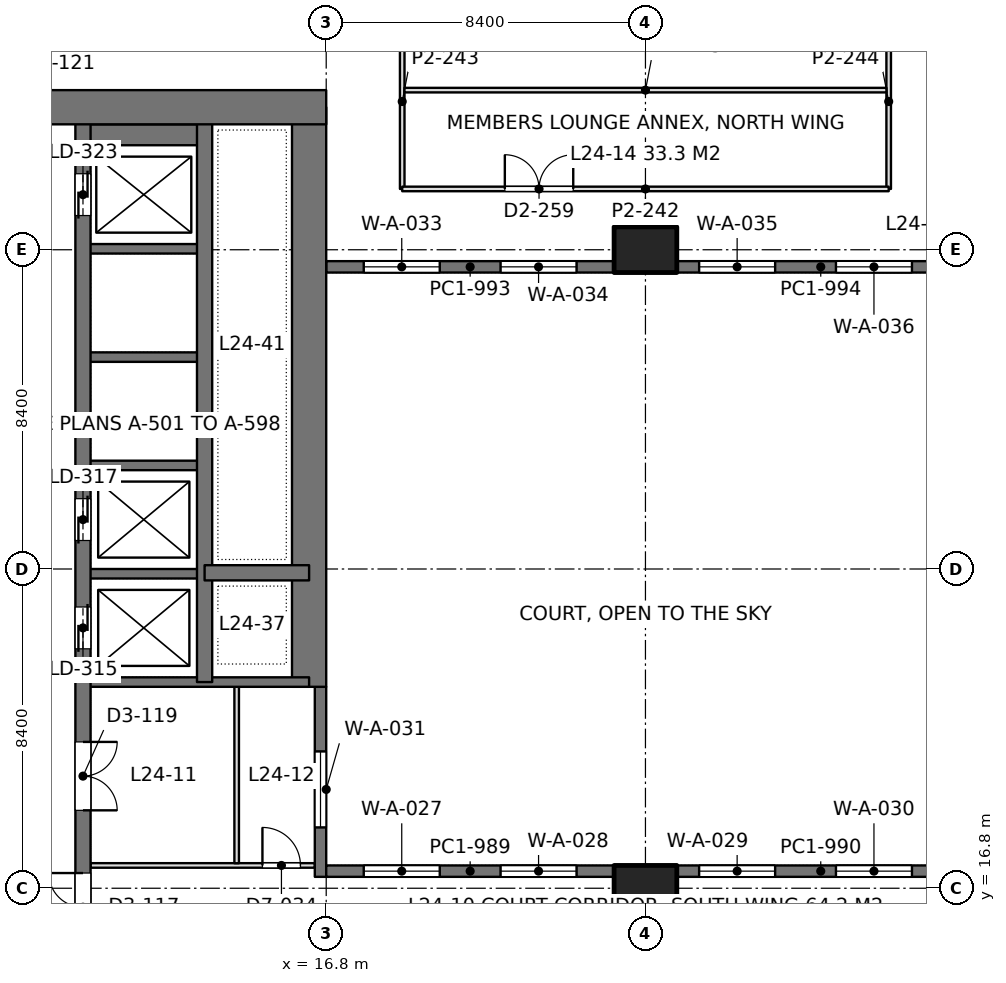
"""IFC4 building model, lengths in metres.
Left out: names, types, materials, properties, quantities, classifications, styles, units other than length and angle.
Written with IfcOpenShell. Run it as: python <this file> out.ifc"""

import sys

from ifc_helpers import new_model, si_unit, direction, frame, frame_2d, origin, origin_2d, place, context, subcontext, project, spatial, rectangle, extrude, element, fill, save


model = new_model("IFC4")
c1 = context("Model", 3, precision=1e-05, world=origin(), true_north=direction((0.0, 1.0)))
c2 = subcontext(c1, "Body", "Model", "MODEL_VIEW")
j1 = project(units=[si_unit("LENGTHUNIT", "METRE"), si_unit("PLANEANGLEUNIT", "RADIAN")], contexts=[c1])
p1 = place(None, origin())
s1 = spatial("IfcSite", under=j1, at=p1, CompositionType="ELEMENT")
p2 = place(p1, origin())
s2 = spatial("IfcBuilding", under=s1, at=p2, CompositionType="ELEMENT")
p3 = place(p2, frame((0.0, 0.0, 109.2)))
s3 = spatial("IfcBuildingStorey", under=s2, at=p3, CompositionType="ELEMENT", Elevation=109.2)
for number, where, z_axis, x_axis in (
    (1, (25.2, 16.8, 0.0), (0.0, 0.0, 1.0), (1.0, 0.0, 0.0)),
    (2, (25.2, 33.6, 0.0), (0.0, 0.0, 1.0), (1.0, 0.0, 0.0)),
):
    element("IfcColumn", number, at=place(p3, frame(where, z_axis=z_axis, x_axis=x_axis)), inside=s3, PredefinedType="COLUMN", context=c2, shape_type="SweptSolid", body=[
        extrude(rectangle(XDim=1.65, YDim=1.2, at=origin_2d()), origin(), (0.0, 0.0, 1.0), 4.2),
    ])
p4 = place(p3, frame((-1.2, 37.35, 0.0), z_axis=(0.0, 0.0, 1.0), x_axis=(1.0, 0.0, 0.0)))
e3 = element("IfcWall", 3, at=p4, inside=s3, PredefinedType="SHEAR", context=c2, shape_type="SweptSolid", body=[
    extrude(rectangle(XDim=18.0, YDim=0.9, at=frame_2d((9.0, 0.0))), origin(), (0.0, 0.0, 1.0), 4.2),
])
p5 = place(p4, frame((8.95, 0.0, 0.0)))
e4 = element("IfcOpeningElement", 4, at=p5, cuts=e3, PredefinedType="OPENING", context=c2, shape_type="SweptSolid", body=[
    extrude(rectangle(XDim=1.8, YDim=2.4, at=frame_2d((0.9, 1.2))), frame((0.0, 0.46, 0.0), z_axis=(0.0, -1.0, 0.0), x_axis=(1.0, 0.0, 0.0)), (0.0, 0.0, 1.0), 0.92),
])
p6 = place(p3, frame((16.35, 22.1, 0.0), z_axis=(0.0, 0.0, 1.0), x_axis=(0.0, 1.0, 0.0)))
e5 = element("IfcWall", 5, at=p6, inside=s3, PredefinedType="SHEAR", context=c2, shape_type="SweptSolid", body=[
    extrude(rectangle(XDim=15.25, YDim=0.9, at=frame_2d((7.625, 0.0))), origin(), (0.0, 0.0, 1.0), 4.2),
])
p7 = place(p3, frame((10.4, 13.05, 0.0), z_axis=(0.0, 0.0, 1.0), x_axis=(0.0, 1.0, 0.0)))
e6 = element("IfcWall", 6, at=p7, inside=s3, PredefinedType="SHEAR", context=c2, shape_type="SweptSolid", body=[
    extrude(rectangle(XDim=24.3, YDim=0.4, at=frame_2d((12.15, 0.0))), origin(), (0.0, 0.0, 1.0), 4.2),
])
p8 = place(p7, frame((10.05, 0.0, 0.0)))
e7 = element("IfcOpeningElement", 7, at=p8, cuts=e6, PredefinedType="OPENING", context=c2, shape_type="SweptSolid", body=[
    extrude(rectangle(XDim=1.1, YDim=2.2, at=frame_2d((0.55, 1.1))), frame((0.0, 0.21, 0.0), z_axis=(0.0, -1.0, 0.0), x_axis=(1.0, 0.0, 0.0)), (0.0, 0.0, 1.0), 0.42),
])
p9 = place(p7, frame((12.9, 0.0, 0.0)))
e8 = element("IfcOpeningElement", 8, at=p9, cuts=e6, PredefinedType="OPENING", context=c2, shape_type="SweptSolid", body=[
    extrude(rectangle(XDim=1.1, YDim=2.2, at=frame_2d((0.55, 1.1))), frame((0.0, 0.21, 0.0), z_axis=(0.0, -1.0, 0.0), x_axis=(1.0, 0.0, 0.0)), (0.0, 0.0, 1.0), 0.42),
])
p10 = place(p7, frame((21.45, 0.0, 0.0)))
e9 = element("IfcOpeningElement", 9, at=p10, cuts=e6, PredefinedType="OPENING", context=c2, shape_type="SweptSolid", body=[
    extrude(rectangle(XDim=1.1, YDim=2.2, at=frame_2d((0.55, 1.1))), frame((0.0, 0.21, 0.0), z_axis=(0.0, -1.0, 0.0), x_axis=(1.0, 0.0, 0.0)), (0.0, 0.0, 1.0), 0.42),
])
p11 = place(p7, frame((2.35, 0.0, 0.0)))
e10 = element("IfcOpeningElement", 10, at=p11, cuts=e6, PredefinedType="OPENING", context=c2, shape_type="SweptSolid", body=[
    extrude(rectangle(XDim=1.8, YDim=2.4, at=frame_2d((0.9, 1.2))), frame((0.0, 0.21, 0.0), z_axis=(0.0, -1.0, 0.0), x_axis=(1.0, 0.0, 0.0)), (0.0, 0.0, 1.0), 0.42),
])
p12 = place(p7, frame((5.8, 0.0, 0.0)))
e11 = element("IfcOpeningElement", 11, at=p12, cuts=e6, PredefinedType="OPENING", context=c2, shape_type="SweptSolid", body=[
    extrude(rectangle(XDim=1.8, YDim=2.4, at=frame_2d((0.9, 1.2))), frame((0.0, 0.21, 0.0), z_axis=(0.0, -1.0, 0.0), x_axis=(1.0, 0.0, 0.0)), (0.0, 0.0, 1.0), 0.42),
])
p13 = place(p3, frame((13.6, 22.225, 0.0), z_axis=(0.0, 0.0, 1.0), x_axis=(0.0, 1.0, 0.0)))
e12 = element("IfcWall", 12, at=p13, inside=s3, PredefinedType="SHEAR", context=c2, shape_type="SweptSolid", body=[
    extrude(rectangle(XDim=15.125, YDim=0.4, at=frame_2d((7.562, 0.0))), origin(), (0.0, 0.0, 1.0), 4.2),
])
p14 = place(p3, frame((13.6, 25.1, 0.0), z_axis=(0.0, 0.0, 1.0), x_axis=(1.0, 0.0, 0.0)))
e13 = element("IfcWall", 13, at=p14, inside=s3, PredefinedType="SHEAR", context=c2, shape_type="SweptSolid", body=[
    extrude(rectangle(XDim=2.75, YDim=0.4, at=frame_2d((1.375, 0.0))), origin(), (0.0, 0.0, 1.0), 4.2),
])
p15 = place(p3, frame((10.4, 22.225, 0.0), z_axis=(0.0, 0.0, 1.0), x_axis=(1.0, 0.0, 0.0)))
e14 = element("IfcWall", 14, at=p15, inside=s3, PredefinedType="SHEAR", context=c2, shape_type="SweptSolid", body=[
    extrude(rectangle(XDim=5.95, YDim=0.25, at=frame_2d((2.975, 0.0))), origin(), (0.0, 0.0, 1.0), 4.2),
])
for number, where, z_axis, x_axis in (
    (15, (10.4, 25.075, 0.0), (0.0, 0.0, 1.0), (1.0, 0.0, 0.0)),
    (16, (10.4, 27.925, 0.0), (0.0, 0.0, 1.0), (1.0, 0.0, 0.0)),
    (17, (10.4, 30.775, 0.0), (0.0, 0.0, 1.0), (1.0, 0.0, 0.0)),
    (18, (10.4, 33.625, 0.0), (0.0, 0.0, 1.0), (1.0, 0.0, 0.0)),
):
    element("IfcWall", number, at=place(p3, frame(where, z_axis=z_axis, x_axis=x_axis)), inside=s3, PredefinedType="SHEAR", context=c2, shape_type="SweptSolid", body=[
        extrude(rectangle(XDim=3.2, YDim=0.25, at=frame_2d((1.6, 0.0))), origin(), (0.0, 0.0, 1.0), 4.2),
    ])
p16 = place(p3, frame((10.4, 36.625, 0.0), z_axis=(0.0, 0.0, 1.0), x_axis=(1.0, 0.0, 0.0)))
e19 = element("IfcWall", 19, at=p16, inside=s3, PredefinedType="SHEAR", context=c2, shape_type="SweptSolid", body=[
    extrude(rectangle(XDim=3.2, YDim=0.55, at=frame_2d((1.6, 0.0))), origin(), (0.0, 0.0, 1.0), 4.2),
])
p17 = place(p3, frame((16.65, 17.1, 0.0), z_axis=(0.0, 0.0, 1.0), x_axis=(0.0, 1.0, 0.0)))
e20 = element("IfcWall", 20, at=p17, inside=s3, PredefinedType="SOLIDWALL", context=c2, shape_type="SweptSolid", body=[
    extrude(rectangle(XDim=5.0, YDim=0.3, at=frame_2d((2.5, 0.0))), origin(), (0.0, 0.0, 1.0), 4.05),
])
p18 = place(p17, frame((1.3, 0.0, 0.1)))
e21 = element("IfcOpeningElement", 21, at=p18, cuts=e20, PredefinedType="OPENING", context=c2, shape_type="SweptSolid", body=[
    extrude(rectangle(XDim=2.0, YDim=3.0, at=frame_2d((1.0, 1.5))), frame((0.0, 0.16, 0.0), z_axis=(0.0, -1.0, 0.0), x_axis=(1.0, 0.0, 0.0)), (0.0, 0.0, 1.0), 0.32),
])
p19 = place(p3, frame((16.8, 17.25, 0.0), z_axis=(0.0, 0.0, 1.0), x_axis=(1.0, 0.0, 0.0)))
e22 = element("IfcWall", 22, at=p19, inside=s3, PredefinedType="SOLIDWALL", context=c2, shape_type="SweptSolid", body=[
    extrude(rectangle(XDim=7.575, YDim=0.3, at=frame_2d((3.788, 0.0))), origin(), (0.0, 0.0, 1.0), 4.05),
])
p20 = place(p19, frame((0.988, 0.0, 0.1)))
e23 = element("IfcOpeningElement", 23, at=p20, cuts=e22, PredefinedType="OPENING", context=c2, shape_type="SweptSolid", body=[
    extrude(rectangle(XDim=2.0, YDim=3.0, at=frame_2d((1.0, 1.5))), frame((0.0, 0.16, 0.0), z_axis=(0.0, -1.0, 0.0), x_axis=(1.0, 0.0, 0.0)), (0.0, 0.0, 1.0), 0.32),
])
p21 = place(p19, frame((4.587, 0.0, 0.1)))
e24 = element("IfcOpeningElement", 24, at=p21, cuts=e22, PredefinedType="OPENING", context=c2, shape_type="SweptSolid", body=[
    extrude(rectangle(XDim=2.0, YDim=3.0, at=frame_2d((1.0, 1.5))), frame((0.0, 0.16, 0.0), z_axis=(0.0, -1.0, 0.0), x_axis=(1.0, 0.0, 0.0)), (0.0, 0.0, 1.0), 0.32),
])
p22 = place(p3, frame((26.025, 17.25, 0.0), z_axis=(0.0, 0.0, 1.0), x_axis=(1.0, 0.0, 0.0)))
e25 = element("IfcWall", 25, at=p22, inside=s3, PredefinedType="SOLIDWALL", context=c2, shape_type="SweptSolid", body=[
    extrude(rectangle(XDim=7.575, YDim=0.3, at=frame_2d((3.788, 0.0))), origin(), (0.0, 0.0, 1.0), 4.05),
])
p23 = place(p22, frame((0.587, 0.0, 0.1)))
e26 = element("IfcOpeningElement", 26, at=p23, cuts=e25, PredefinedType="OPENING", context=c2, shape_type="SweptSolid", body=[
    extrude(rectangle(XDim=2.0, YDim=3.0, at=frame_2d((1.0, 1.5))), frame((0.0, 0.16, 0.0), z_axis=(0.0, -1.0, 0.0), x_axis=(1.0, 0.0, 0.0)), (0.0, 0.0, 1.0), 0.32),
])
p24 = place(p22, frame((4.188, 0.0, 0.1)))
e27 = element("IfcOpeningElement", 27, at=p24, cuts=e25, PredefinedType="OPENING", context=c2, shape_type="SweptSolid", body=[
    extrude(rectangle(XDim=2.0, YDim=3.0, at=frame_2d((1.0, 1.5))), frame((0.0, 0.16, 0.0), z_axis=(0.0, -1.0, 0.0), x_axis=(1.0, 0.0, 0.0)), (0.0, 0.0, 1.0), 0.32),
])
p25 = place(p3, frame((16.8, 33.15, 0.0), z_axis=(0.0, 0.0, 1.0), x_axis=(1.0, 0.0, 0.0)))
e28 = element("IfcWall", 28, at=p25, inside=s3, PredefinedType="SOLIDWALL", context=c2, shape_type="SweptSolid", body=[
    extrude(rectangle(XDim=7.575, YDim=0.3, at=frame_2d((3.788, 0.0))), origin(), (0.0, 0.0, 1.0), 4.05),
])
p26 = place(p25, frame((0.988, 0.0, 0.1)))
e29 = element("IfcOpeningElement", 29, at=p26, cuts=e28, PredefinedType="OPENING", context=c2, shape_type="SweptSolid", body=[
    extrude(rectangle(XDim=2.0, YDim=3.0, at=frame_2d((1.0, 1.5))), frame((0.0, 0.16, 0.0), z_axis=(0.0, -1.0, 0.0), x_axis=(1.0, 0.0, 0.0)), (0.0, 0.0, 1.0), 0.32),
])
p27 = place(p25, frame((4.587, 0.0, 0.1)))
e30 = element("IfcOpeningElement", 30, at=p27, cuts=e28, PredefinedType="OPENING", context=c2, shape_type="SweptSolid", body=[
    extrude(rectangle(XDim=2.0, YDim=3.0, at=frame_2d((1.0, 1.5))), frame((0.0, 0.16, 0.0), z_axis=(0.0, -1.0, 0.0), x_axis=(1.0, 0.0, 0.0)), (0.0, 0.0, 1.0), 0.32),
])
p28 = place(p3, frame((26.025, 33.15, 0.0), z_axis=(0.0, 0.0, 1.0), x_axis=(1.0, 0.0, 0.0)))
e31 = element("IfcWall", 31, at=p28, inside=s3, PredefinedType="SOLIDWALL", context=c2, shape_type="SweptSolid", body=[
    extrude(rectangle(XDim=7.575, YDim=0.3, at=frame_2d((3.788, 0.0))), origin(), (0.0, 0.0, 1.0), 4.05),
])
p29 = place(p28, frame((0.587, 0.0, 0.1)))
e32 = element("IfcOpeningElement", 32, at=p29, cuts=e31, PredefinedType="OPENING", context=c2, shape_type="SweptSolid", body=[
    extrude(rectangle(XDim=2.0, YDim=3.0, at=frame_2d((1.0, 1.5))), frame((0.0, 0.16, 0.0), z_axis=(0.0, -1.0, 0.0), x_axis=(1.0, 0.0, 0.0)), (0.0, 0.0, 1.0), 0.32),
])
p30 = place(p28, frame((4.188, 0.0, 0.1)))
e33 = element("IfcOpeningElement", 33, at=p30, cuts=e31, PredefinedType="OPENING", context=c2, shape_type="SweptSolid", body=[
    extrude(rectangle(XDim=2.0, YDim=3.0, at=frame_2d((1.0, 1.5))), frame((0.0, 0.16, 0.0), z_axis=(0.0, -1.0, 0.0), x_axis=(1.0, 0.0, 0.0)), (0.0, 0.0, 1.0), 0.32),
])
p31 = place(p3, frame((10.598, 17.4, 0.0), z_axis=(0.0, 0.0, 1.0), x_axis=(1.0, 0.0, 0.0)))
e34 = element("IfcWall", 34, at=p31, inside=s3, PredefinedType="PARTITIONING", context=c2, shape_type="SweptSolid", body=[
    extrude(rectangle(XDim=5.904, YDim=0.12, at=frame_2d((2.952, 0.0))), origin(), (0.0, 0.0, 1.0), 3.55),
])
p32 = place(p31, frame((4.524, 0.0, 0.0)))
e35 = element("IfcOpeningElement", 35, at=p32, cuts=e34, PredefinedType="OPENING", context=c2, shape_type="SweptSolid", body=[
    extrude(rectangle(XDim=1.0, YDim=2.4, at=frame_2d((0.5, 1.2))), frame((0.0, 0.07, 0.0), z_axis=(0.0, -1.0, 0.0), x_axis=(1.0, 0.0, 0.0)), (0.0, 0.0, 1.0), 0.14),
])
p33 = place(p3, frame((14.444, 17.458, 0.0), z_axis=(0.0, 0.0, 1.0), x_axis=(0.0, 1.0, 0.0)))
e36 = element("IfcWall", 36, at=p33, inside=s3, PredefinedType="PARTITIONING", context=c2, shape_type="SweptSolid", body=[
    extrude(rectangle(XDim=4.644, YDim=0.12, at=frame_2d((2.322, 0.0))), origin(), (0.0, 0.0, 1.0), 3.6),
])
for number, where, z_axis, x_axis in (
    (37, (18.8, 35.2, 0.0), (0.0, 0.0, 1.0), (0.0, 1.0, 0.0)),
    (38, (31.6, 35.2, 0.0), (0.0, 0.0, 1.0), (0.0, 1.0, 0.0)),
):
    element("IfcWall", number, at=place(p3, frame(where, z_axis=z_axis, x_axis=x_axis)), inside=s3, PredefinedType="PARTITIONING", context=c2, shape_type="SweptSolid", body=[
        extrude(rectangle(XDim=4.6, YDim=0.12, at=frame_2d((2.3, 0.0))), origin(), (0.0, 0.0, 1.0), 4.05),
    ])
p34 = place(p3, frame((18.8, 35.2, 0.0), z_axis=(0.0, 0.0, 1.0), x_axis=(1.0, 0.0, 0.0)))
e39 = element("IfcWall", 39, at=p34, inside=s3, PredefinedType="PARTITIONING", context=c2, shape_type="SweptSolid", body=[
    extrude(rectangle(XDim=12.8, YDim=0.12, at=frame_2d((6.4, 0.0))), origin(), (0.0, 0.0, 1.0), 3.55),
])
p35 = place(p34, frame((2.7, 0.0, 0.0)))
e40 = element("IfcOpeningElement", 40, at=p35, cuts=e39, PredefinedType="OPENING", context=c2, shape_type="SweptSolid", body=[
    extrude(rectangle(XDim=1.8, YDim=2.2, at=frame_2d((0.9, 1.1))), frame((0.0, 0.07, 0.0), z_axis=(0.0, -1.0, 0.0), x_axis=(1.0, 0.0, 0.0)), (0.0, 0.0, 1.0), 0.14),
])
p36 = place(p3, frame((18.858, 37.8, 0.0), z_axis=(0.0, 0.0, 1.0), x_axis=(1.0, 0.0, 0.0)))
e41 = element("IfcWall", 41, at=p36, inside=s3, PredefinedType="PARTITIONING", context=c2, shape_type="SweptSolid", body=[
    extrude(rectangle(XDim=12.684, YDim=0.12, at=frame_2d((6.342, 0.0))), origin(), (0.0, 0.0, 1.0), 3.55),
])
p37 = place(p18, origin())
e42 = element("IfcWindow", 42, at=p37, inside=s3, PartitioningType="SINGLE_PANEL", PredefinedType="WINDOW", context=c2, shape_type="SweptSolid", body=[
    extrude(rectangle(XDim=2.0, YDim=3.0, at=frame_2d((1.0, 1.5))), frame((0.0, 0.03, 0.0), z_axis=(0.0, -1.0, 0.0), x_axis=(1.0, 0.0, 0.0)), (0.0, 0.0, 1.0), 0.06),
])
fill(e21, e42)
p38 = place(p20, origin())
e43 = element("IfcWindow", 43, at=p38, inside=s3, PartitioningType="SINGLE_PANEL", PredefinedType="WINDOW", context=c2, shape_type="SweptSolid", body=[
    extrude(rectangle(XDim=2.0, YDim=3.0, at=frame_2d((1.0, 1.5))), frame((0.0, 0.03, 0.0), z_axis=(0.0, -1.0, 0.0), x_axis=(1.0, 0.0, 0.0)), (0.0, 0.0, 1.0), 0.06),
])
fill(e23, e43)
p39 = place(p21, origin())
e44 = element("IfcWindow", 44, at=p39, inside=s3, PartitioningType="SINGLE_PANEL", PredefinedType="WINDOW", context=c2, shape_type="SweptSolid", body=[
    extrude(rectangle(XDim=2.0, YDim=3.0, at=frame_2d((1.0, 1.5))), frame((0.0, 0.03, 0.0), z_axis=(0.0, -1.0, 0.0), x_axis=(1.0, 0.0, 0.0)), (0.0, 0.0, 1.0), 0.06),
])
fill(e24, e44)
p40 = place(p23, origin())
e45 = element("IfcWindow", 45, at=p40, inside=s3, PartitioningType="SINGLE_PANEL", PredefinedType="WINDOW", context=c2, shape_type="SweptSolid", body=[
    extrude(rectangle(XDim=2.0, YDim=3.0, at=frame_2d((1.0, 1.5))), frame((0.0, 0.03, 0.0), z_axis=(0.0, -1.0, 0.0), x_axis=(1.0, 0.0, 0.0)), (0.0, 0.0, 1.0), 0.06),
])
fill(e26, e45)
p41 = place(p24, origin())
e46 = element("IfcWindow", 46, at=p41, inside=s3, PartitioningType="SINGLE_PANEL", PredefinedType="WINDOW", context=c2, shape_type="SweptSolid", body=[
    extrude(rectangle(XDim=2.0, YDim=3.0, at=frame_2d((1.0, 1.5))), frame((0.0, 0.03, 0.0), z_axis=(0.0, -1.0, 0.0), x_axis=(1.0, 0.0, 0.0)), (0.0, 0.0, 1.0), 0.06),
])
fill(e27, e46)
p42 = place(p26, origin())
e47 = element("IfcWindow", 47, at=p42, inside=s3, PartitioningType="SINGLE_PANEL", PredefinedType="WINDOW", context=c2, shape_type="SweptSolid", body=[
    extrude(rectangle(XDim=2.0, YDim=3.0, at=frame_2d((1.0, 1.5))), frame((0.0, 0.03, 0.0), z_axis=(0.0, -1.0, 0.0), x_axis=(1.0, 0.0, 0.0)), (0.0, 0.0, 1.0), 0.06),
])
fill(e29, e47)
p43 = place(p27, origin())
e48 = element("IfcWindow", 48, at=p43, inside=s3, PartitioningType="SINGLE_PANEL", PredefinedType="WINDOW", context=c2, shape_type="SweptSolid", body=[
    extrude(rectangle(XDim=2.0, YDim=3.0, at=frame_2d((1.0, 1.5))), frame((0.0, 0.03, 0.0), z_axis=(0.0, -1.0, 0.0), x_axis=(1.0, 0.0, 0.0)), (0.0, 0.0, 1.0), 0.06),
])
fill(e30, e48)
p44 = place(p29, origin())
e49 = element("IfcWindow", 49, at=p44, inside=s3, PartitioningType="SINGLE_PANEL", PredefinedType="WINDOW", context=c2, shape_type="SweptSolid", body=[
    extrude(rectangle(XDim=2.0, YDim=3.0, at=frame_2d((1.0, 1.5))), frame((0.0, 0.03, 0.0), z_axis=(0.0, -1.0, 0.0), x_axis=(1.0, 0.0, 0.0)), (0.0, 0.0, 1.0), 0.06),
])
fill(e32, e49)
p45 = place(p30, origin())
e50 = element("IfcWindow", 50, at=p45, inside=s3, PartitioningType="SINGLE_PANEL", PredefinedType="WINDOW", context=c2, shape_type="SweptSolid", body=[
    extrude(rectangle(XDim=2.0, YDim=3.0, at=frame_2d((1.0, 1.5))), frame((0.0, 0.03, 0.0), z_axis=(0.0, -1.0, 0.0), x_axis=(1.0, 0.0, 0.0)), (0.0, 0.0, 1.0), 0.06),
])
fill(e33, e50)
p46 = place(p8, origin())
e51 = element("IfcDoor", 51, at=p46, inside=s3, OperationType="DOUBLE_DOOR_SLIDING", PredefinedType="DOOR", context=c2, shape_type="SweptSolid", body=[
    extrude(rectangle(XDim=1.1, YDim=2.2, at=frame_2d((0.55, 1.1))), frame((0.0, 0.025, 0.0), z_axis=(0.0, -1.0, 0.0), x_axis=(1.0, 0.0, 0.0)), (0.0, 0.0, 1.0), 0.05),
])
fill(e7, e51)
p47 = place(p9, origin())
e52 = element("IfcDoor", 52, at=p47, inside=s3, OperationType="DOUBLE_DOOR_SLIDING", PredefinedType="DOOR", context=c2, shape_type="SweptSolid", body=[
    extrude(rectangle(XDim=1.1, YDim=2.2, at=frame_2d((0.55, 1.1))), frame((0.0, 0.025, 0.0), z_axis=(0.0, -1.0, 0.0), x_axis=(1.0, 0.0, 0.0)), (0.0, 0.0, 1.0), 0.05),
])
fill(e8, e52)
p48 = place(p10, origin())
e53 = element("IfcDoor", 53, at=p48, inside=s3, OperationType="DOUBLE_DOOR_SLIDING", PredefinedType="DOOR", context=c2, shape_type="SweptSolid", body=[
    extrude(rectangle(XDim=1.1, YDim=2.2, at=frame_2d((0.55, 1.1))), frame((0.0, 0.025, 0.0), z_axis=(0.0, -1.0, 0.0), x_axis=(1.0, 0.0, 0.0)), (0.0, 0.0, 1.0), 0.05),
])
fill(e9, e53)
p49 = place(p11, origin())
e54 = element("IfcDoor", 54, at=p49, inside=s3, OperationType="DOUBLE_DOOR_SINGLE_SWING", PredefinedType="DOOR", context=c2, shape_type="SweptSolid", body=[
    extrude(rectangle(XDim=1.8, YDim=2.4, at=frame_2d((0.9, 1.2))), frame((0.0, 0.025, 0.0), z_axis=(0.0, -1.0, 0.0), x_axis=(1.0, 0.0, 0.0)), (0.0, 0.0, 1.0), 0.05),
])
fill(e10, e54)
p50 = place(p12, frame((1.8, 0.0, 0.0), z_axis=(0.0, 0.0, 1.0), x_axis=(-1.0, 0.0, 0.0)))
e55 = element("IfcDoor", 55, at=p50, inside=s3, OperationType="DOUBLE_DOOR_SINGLE_SWING", PredefinedType="DOOR", context=c2, shape_type="SweptSolid", body=[
    extrude(rectangle(XDim=1.8, YDim=2.4, at=frame_2d((0.9, 1.2))), frame((0.0, 0.025, 0.0), z_axis=(0.0, -1.0, 0.0), x_axis=(1.0, 0.0, 0.0)), (0.0, 0.0, 1.0), 0.05),
])
fill(e11, e55)
p51 = place(p32, origin())
e56 = element("IfcDoor", 56, at=p51, inside=s3, OperationType="SINGLE_SWING_LEFT", PredefinedType="DOOR", context=c2, shape_type="SweptSolid", body=[
    extrude(rectangle(XDim=1.0, YDim=2.4, at=frame_2d((0.5, 1.2))), frame((0.0, 0.025, 0.0), z_axis=(0.0, -1.0, 0.0), x_axis=(1.0, 0.0, 0.0)), (0.0, 0.0, 1.0), 0.05),
])
fill(e35, e56)
p52 = place(p35, origin())
e57 = element("IfcDoor", 57, at=p52, inside=s3, OperationType="DOUBLE_DOOR_SINGLE_SWING", PredefinedType="DOOR", context=c2, shape_type="SweptSolid", body=[
    extrude(rectangle(XDim=1.8, YDim=2.2, at=frame_2d((0.9, 1.1))), frame((0.0, 0.025, 0.0), z_axis=(0.0, -1.0, 0.0), x_axis=(1.0, 0.0, 0.0)), (0.0, 0.0, 1.0), 0.05),
])
fill(e40, e57)
save(model, sys.argv[1])
